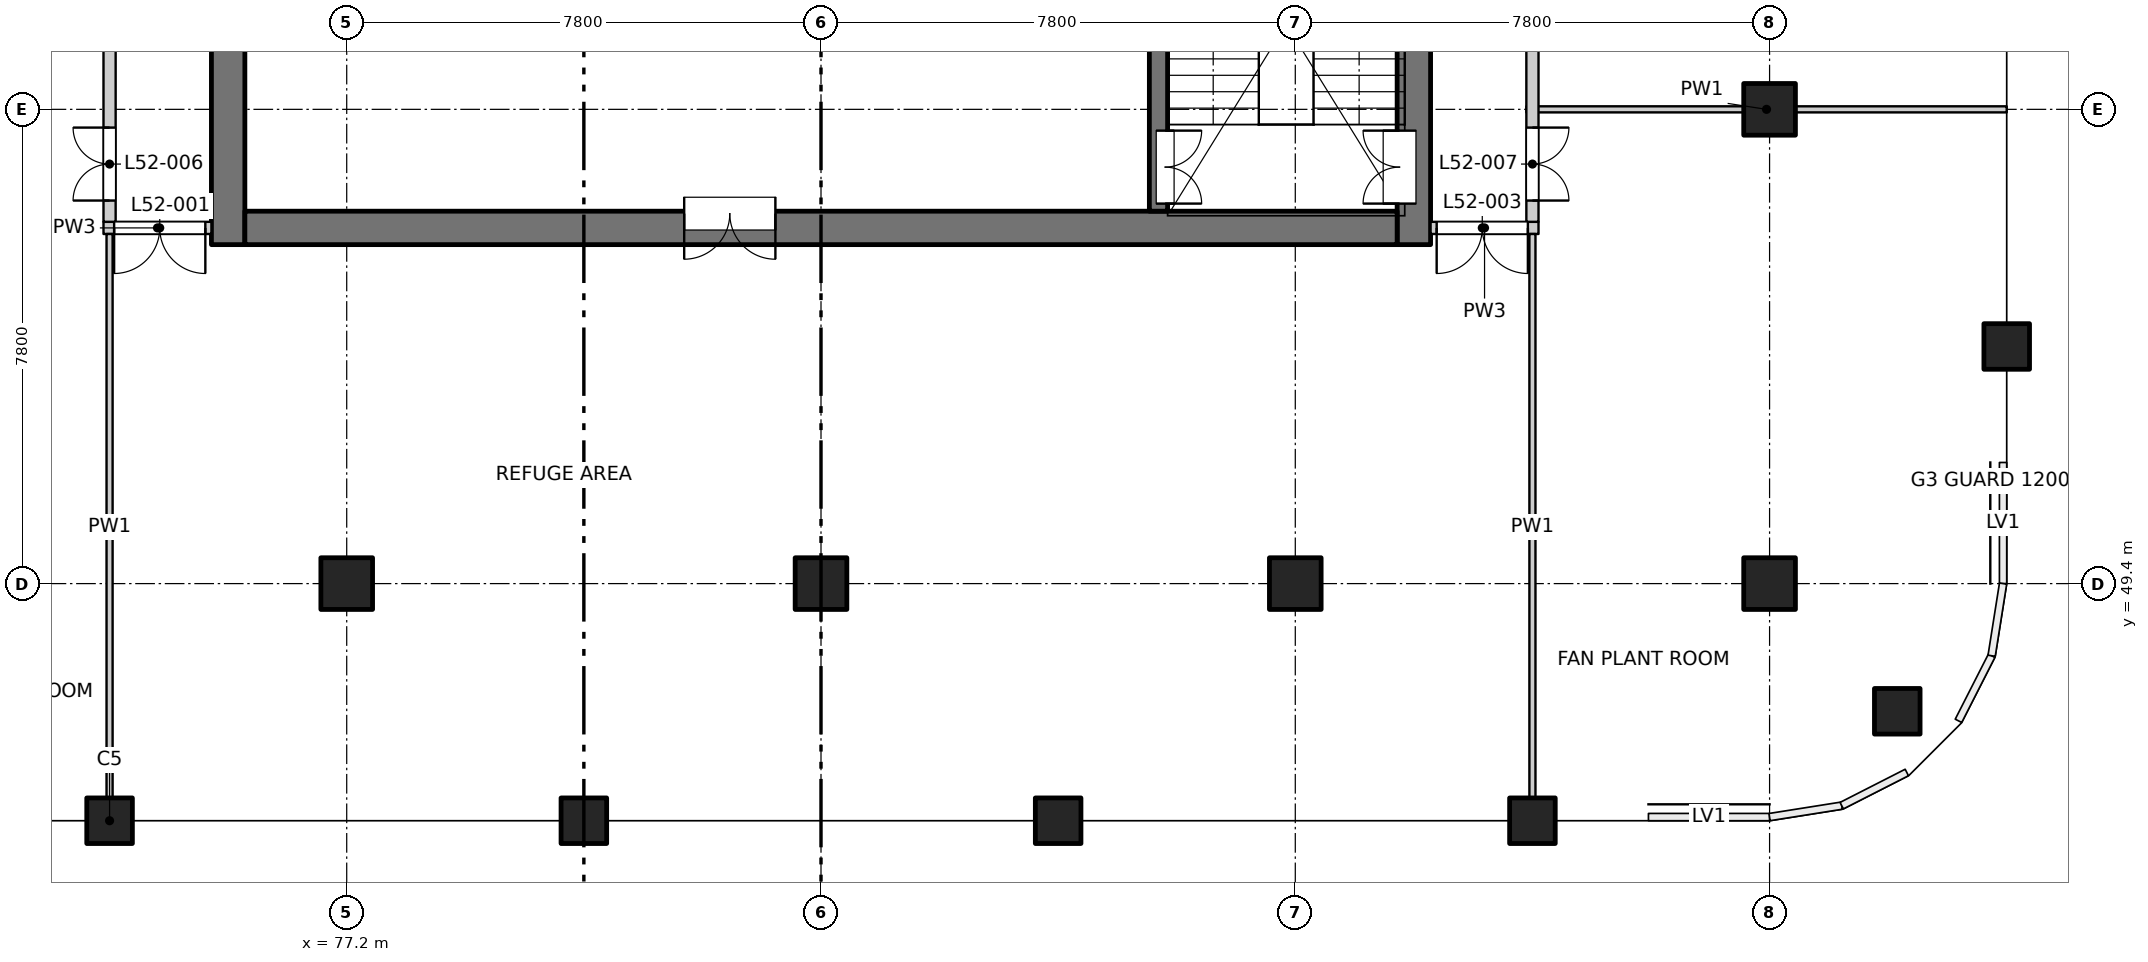
"""IFC4 building model, lengths in metres.
Left out: names, types, materials, properties, quantities, classifications, styles, units other than length and angle.
Written with IfcOpenShell. Run it as: python <this file> out.ifc"""

import sys

from ifc_helpers import new_model, si_unit, direction, frame, frame_2d, origin, origin_2d, place, context, subcontext, project, spatial, rectangle, extrude, element, fill, save


model = new_model("IFC4")
c1 = context("Model", 3, precision=1e-05, world=origin(), true_north=direction((0.0, 1.0)))
c2 = subcontext(c1, "Body", "Model", "MODEL_VIEW")
j1 = project(units=[si_unit("LENGTHUNIT", "METRE"), si_unit("PLANEANGLEUNIT", "RADIAN")], contexts=[c1])
p1 = place(None, origin())
s1 = spatial("IfcSite", under=j1, at=p1, CompositionType="ELEMENT")
p2 = place(p1, origin())
s2 = spatial("IfcBuilding", under=s1, at=p2, CompositionType="ELEMENT")
p3 = place(p2, frame((0.0, 0.0, 192.8)))
s3 = spatial("IfcBuildingStorey", under=s2, at=p3, CompositionType="ELEMENT", Elevation=192.8)
for number, where, z_axis, x_axis in (
    (1, (102.7, 47.3, -0.3), (0.0, 0.0, 1.0), (1.0, 0.0, 0.0)),
    (2, (104.5, 53.3, -0.3), (0.0, 0.0, 1.0), (1.0, 0.0, 0.0)),
    (3, (73.3, 45.5, -0.3), (0.0, 0.0, 1.0), (1.0, 0.0, 0.0)),
    (4, (81.1, 45.5, -0.3), (0.0, 0.0, 1.0), (1.0, 0.0, 0.0)),
    (5, (88.9, 45.5, -0.3), (0.0, 0.0, 1.0), (1.0, 0.0, 0.0)),
    (6, (96.7, 45.5, -0.3), (0.0, 0.0, 1.0), (1.0, 0.0, 0.0)),
):
    element("IfcColumn", number, at=place(p3, frame(where, z_axis=z_axis, x_axis=x_axis)), inside=s3, PredefinedType="COLUMN", context=c2, shape_type="SweptSolid", body=[
        extrude(rectangle(XDim=0.75, YDim=0.75, at=origin_2d()), origin(), (0.0, 0.0, 1.0), 4.5),
    ])
for number, where, z_axis, x_axis in (
    (7, (77.2, 49.4, -0.3), (0.0, 0.0, 1.0), (1.0, 0.0, 0.0)),
    (8, (85.0, 49.4, -0.3), (0.0, 0.0, 1.0), (1.0, 0.0, 0.0)),
    (9, (92.8, 49.4, -0.3), (0.0, 0.0, 1.0), (1.0, 0.0, 0.0)),
    (10, (100.6, 49.4, -0.3), (0.0, 0.0, 1.0), (1.0, 0.0, 0.0)),
    (11, (100.6, 57.2, -0.3), (0.0, 0.0, 1.0), (1.0, 0.0, 0.0)),
):
    element("IfcColumn", number, at=place(p3, frame(where, z_axis=z_axis, x_axis=x_axis)), inside=s3, PredefinedType="COLUMN", context=c2, shape_type="SweptSolid", body=[
        extrude(rectangle(XDim=0.85, YDim=0.85, at=origin_2d()), origin(), (0.0, 0.0, 1.0), 4.5),
    ])
p4 = place(p3, frame((75.25, 54.975, -0.3), z_axis=(0.0, 0.0, 1.0), x_axis=(0.0, 1.0, 0.0)))
e12 = element("IfcWall", 12, at=p4, inside=s3, PredefinedType="SOLIDWALL", context=c2, shape_type="SweptSolid", body=[
    extrude(rectangle(XDim=22.325, YDim=0.55, at=frame_2d((11.163, 0.0))), origin(), (0.0, 0.0, 1.0), 4.5),
])
p5 = place(p4, frame((7.475, 0.0, 0.3)))
e13 = element("IfcOpeningElement", 13, at=p5, cuts=e12, PredefinedType="OPENING", context=c2, shape_type="SweptSolid", body=[
    extrude(rectangle(XDim=0.9, YDim=2.1, at=frame_2d((0.45, 1.05))), frame((0.0, 0.285, 0.0), z_axis=(0.0, -1.0, 0.0), x_axis=(1.0, 0.0, 0.0)), (0.0, 0.0, 1.0), 0.57),
])
p6 = place(p4, frame((12.125, 0.0, 0.3)))
e14 = element("IfcOpeningElement", 14, at=p6, cuts=e12, PredefinedType="OPENING", context=c2, shape_type="SweptSolid", body=[
    extrude(rectangle(XDim=0.9, YDim=2.1, at=frame_2d((0.45, 1.05))), frame((0.0, 0.285, 0.0), z_axis=(0.0, -1.0, 0.0), x_axis=(1.0, 0.0, 0.0)), (0.0, 0.0, 1.0), 0.57),
])
p7 = place(p4, frame((16.625, 0.0, 0.3)))
e15 = element("IfcOpeningElement", 15, at=p7, cuts=e12, PredefinedType="OPENING", context=c2, shape_type="SweptSolid", body=[
    extrude(rectangle(XDim=0.9, YDim=2.1, at=frame_2d((0.45, 1.05))), frame((0.0, 0.285, 0.0), z_axis=(0.0, -1.0, 0.0), x_axis=(1.0, 0.0, 0.0)), (0.0, 0.0, 1.0), 0.57),
])
p8 = place(p4, frame((20.075, 0.0, 0.3)))
e16 = element("IfcOpeningElement", 16, at=p8, cuts=e12, PredefinedType="OPENING", context=c2, shape_type="SweptSolid", body=[
    extrude(rectangle(XDim=0.9, YDim=2.1, at=frame_2d((0.45, 1.05))), frame((0.0, 0.285, 0.0), z_axis=(0.0, -1.0, 0.0), x_axis=(1.0, 0.0, 0.0)), (0.0, 0.0, 1.0), 0.57),
])
p9 = place(p3, frame((94.75, 54.975, -0.3), z_axis=(0.0, 0.0, 1.0), x_axis=(0.0, 1.0, 0.0)))
e17 = element("IfcWall", 17, at=p9, inside=s3, PredefinedType="SOLIDWALL", context=c2, shape_type="SweptSolid", body=[
    extrude(rectangle(XDim=6.975, YDim=0.55, at=frame_2d((3.487, 0.0))), origin(), (0.0, 0.0, 1.0), 4.5),
])
p10 = place(p9, frame((0.675, 0.0, 0.3)))
e18 = element("IfcOpeningElement", 18, at=p10, cuts=e17, PredefinedType="OPENING", context=c2, shape_type="SweptSolid", body=[
    extrude(rectangle(XDim=1.2, YDim=2.1, at=frame_2d((0.6, 1.05))), frame((0.0, 0.285, 0.0), z_axis=(0.0, -1.0, 0.0), x_axis=(1.0, 0.0, 0.0)), (0.0, 0.0, 1.0), 0.57),
])
p11 = place(p3, frame((75.525, 55.25, -0.3), z_axis=(0.0, 0.0, 1.0), x_axis=(1.0, 0.0, 0.0)))
e19 = element("IfcWall", 19, at=p11, inside=s3, PredefinedType="SOLIDWALL", context=c2, shape_type="SweptSolid", body=[
    extrude(rectangle(XDim=18.95, YDim=0.55, at=frame_2d((9.475, 0.0))), origin(), (0.0, 0.0, 1.0), 4.5),
])
p12 = place(p11, frame((7.225, 0.0, 0.3)))
e20 = element("IfcOpeningElement", 20, at=p12, cuts=e19, PredefinedType="OPENING", context=c2, shape_type="SweptSolid", body=[
    extrude(rectangle(XDim=1.5, YDim=2.1, at=frame_2d((0.75, 1.05))), frame((0.0, 0.285, 0.0), z_axis=(0.0, -1.0, 0.0), x_axis=(1.0, 0.0, 0.0)), (0.0, 0.0, 1.0), 0.57),
])
p13 = place(p3, frame((90.55, 55.525, -0.3), z_axis=(0.0, 0.0, 1.0), x_axis=(0.0, 1.0, 0.0)))
e21 = element("IfcWall", 21, at=p13, inside=s3, PredefinedType="SOLIDWALL", context=c2, shape_type="SweptSolid", body=[
    extrude(rectangle(XDim=6.425, YDim=0.3, at=frame_2d((3.212, 0.0))), origin(), (0.0, 0.0, 1.0), 4.5),
])
p14 = place(p13, frame((0.125, 0.0, 0.3)))
e22 = element("IfcOpeningElement", 22, at=p14, cuts=e21, PredefinedType="OPENING", context=c2, shape_type="SweptSolid", body=[
    extrude(rectangle(XDim=1.2, YDim=2.1, at=frame_2d((0.6, 1.05))), frame((0.0, 0.16, 0.0), z_axis=(0.0, -1.0, 0.0), x_axis=(1.0, 0.0, 0.0)), (0.0, 0.0, 1.0), 0.32),
])
p15 = place(p3, frame((73.2, 55.25, 0.0), z_axis=(0.0, 0.0, 1.0), x_axis=(1.0, 0.0, 0.0)))
e23 = element("IfcWall", 23, at=p15, inside=s3, PredefinedType="PARTITIONING", context=c2, shape_type="SweptSolid", body=[
    extrude(rectangle(XDim=1.775, YDim=0.2, at=frame_2d((0.887, 0.0))), origin(), (0.0, 0.0, 1.0), 4.2),
])
p16 = place(p15, frame((0.175, 0.0, 0.0)))
e24 = element("IfcOpeningElement", 24, at=p16, cuts=e23, PredefinedType="OPENING", context=c2, shape_type="SweptSolid", body=[
    extrude(rectangle(XDim=1.5, YDim=2.1, at=frame_2d((0.75, 1.05))), frame((0.0, 0.11, 0.0), z_axis=(0.0, -1.0, 0.0), x_axis=(1.0, 0.0, 0.0)), (0.0, 0.0, 1.0), 0.22),
])
p17 = place(p3, frame((95.025, 55.25, 0.0), z_axis=(0.0, 0.0, 1.0), x_axis=(1.0, 0.0, 0.0)))
e25 = element("IfcWall", 25, at=p17, inside=s3, PredefinedType="PARTITIONING", context=c2, shape_type="SweptSolid", body=[
    extrude(rectangle(XDim=1.775, YDim=0.2, at=frame_2d((0.887, 0.0))), origin(), (0.0, 0.0, 1.0), 4.2),
])
p18 = place(p17, frame((0.1, 0.0, 0.0)))
e26 = element("IfcOpeningElement", 26, at=p18, cuts=e25, PredefinedType="OPENING", context=c2, shape_type="SweptSolid", body=[
    extrude(rectangle(XDim=1.5, YDim=2.1, at=frame_2d((0.75, 1.05))), frame((0.0, 0.11, 0.0), z_axis=(0.0, -1.0, 0.0), x_axis=(1.0, 0.0, 0.0)), (0.0, 0.0, 1.0), 0.22),
])
p19 = place(p3, frame((96.6, 57.2, 0.0), z_axis=(0.0, 0.0, 1.0), x_axis=(1.0, 0.0, 0.0)))
e27 = element("IfcWall", 27, at=p19, inside=s3, PredefinedType="PARTITIONING", context=c2, shape_type="SweptSolid", body=[
    extrude(rectangle(XDim=7.9, YDim=0.1, at=frame_2d((3.95, 0.0))), origin(), (0.0, 0.0, 1.0), 4.2),
])
p20 = place(p3, frame((73.3, 45.5, 0.0), z_axis=(0.0, 0.0, 1.0), x_axis=(0.0, 1.0, 0.0)))
e28 = element("IfcWall", 28, at=p20, inside=s3, PredefinedType="PARTITIONING", context=c2, shape_type="SweptSolid", body=[
    extrude(rectangle(XDim=9.65, YDim=0.1, at=frame_2d((4.825, 0.0))), origin(), (0.0, 0.0, 1.0), 4.2),
])
p21 = place(p3, frame((73.3, 55.35, 0.0), z_axis=(0.0, 0.0, 1.0), x_axis=(0.0, 1.0, 0.0)))
e29 = element("IfcWall", 29, at=p21, inside=s3, PredefinedType="PARTITIONING", context=c2, shape_type="SweptSolid", body=[
    extrude(rectangle(XDim=29.15, YDim=0.2, at=frame_2d((14.575, 0.0))), origin(), (0.0, 0.0, 1.0), 4.2),
])
p22 = place(p21, frame((0.35, 0.0, 0.0)))
e30 = element("IfcOpeningElement", 30, at=p22, cuts=e29, PredefinedType="OPENING", context=c2, shape_type="SweptSolid", body=[
    extrude(rectangle(XDim=1.2, YDim=2.1, at=frame_2d((0.6, 1.05))), frame((0.0, 0.11, 0.0), z_axis=(0.0, -1.0, 0.0), x_axis=(1.0, 0.0, 0.0)), (0.0, 0.0, 1.0), 0.22),
])
p23 = place(p21, frame((7.1, 0.0, 0.0)))
e31 = element("IfcOpeningElement", 31, at=p23, cuts=e29, PredefinedType="OPENING", context=c2, shape_type="SweptSolid", body=[
    extrude(rectangle(XDim=1.2, YDim=2.1, at=frame_2d((0.6, 1.05))), frame((0.0, 0.11, 0.0), z_axis=(0.0, -1.0, 0.0), x_axis=(1.0, 0.0, 0.0)), (0.0, 0.0, 1.0), 0.22),
])
p24 = place(p21, frame((26.6, 0.0, 0.0)))
e32 = element("IfcOpeningElement", 32, at=p24, cuts=e29, PredefinedType="OPENING", context=c2, shape_type="SweptSolid", body=[
    extrude(rectangle(XDim=1.2, YDim=2.1, at=frame_2d((0.6, 1.05))), frame((0.0, 0.11, 0.0), z_axis=(0.0, -1.0, 0.0), x_axis=(1.0, 0.0, 0.0)), (0.0, 0.0, 1.0), 0.22),
])
p25 = place(p3, frame((96.7, 45.5, 0.0), z_axis=(0.0, 0.0, 1.0), x_axis=(0.0, 1.0, 0.0)))
e33 = element("IfcWall", 33, at=p25, inside=s3, PredefinedType="PARTITIONING", context=c2, shape_type="SweptSolid", body=[
    extrude(rectangle(XDim=9.65, YDim=0.1, at=frame_2d((4.825, 0.0))), origin(), (0.0, 0.0, 1.0), 4.2),
])
p26 = place(p3, frame((96.7, 55.35, 0.0), z_axis=(0.0, 0.0, 1.0), x_axis=(0.0, 1.0, 0.0)))
e34 = element("IfcWall", 34, at=p26, inside=s3, PredefinedType="PARTITIONING", context=c2, shape_type="SweptSolid", body=[
    extrude(rectangle(XDim=29.15, YDim=0.2, at=frame_2d((14.575, 0.0))), origin(), (0.0, 0.0, 1.0), 4.2),
])
p27 = place(p26, frame((0.35, 0.0, 0.0)))
e35 = element("IfcOpeningElement", 35, at=p27, cuts=e34, PredefinedType="OPENING", context=c2, shape_type="SweptSolid", body=[
    extrude(rectangle(XDim=1.2, YDim=2.1, at=frame_2d((0.6, 1.05))), frame((0.0, 0.11, 0.0), z_axis=(0.0, -1.0, 0.0), x_axis=(1.0, 0.0, 0.0)), (0.0, 0.0, 1.0), 0.22),
])
p28 = place(p26, frame((3.2, 0.0, 0.0)))
e36 = element("IfcOpeningElement", 36, at=p28, cuts=e34, PredefinedType="OPENING", context=c2, shape_type="SweptSolid", body=[
    extrude(rectangle(XDim=1.2, YDim=2.1, at=frame_2d((0.6, 1.05))), frame((0.0, 0.11, 0.0), z_axis=(0.0, -1.0, 0.0), x_axis=(1.0, 0.0, 0.0)), (0.0, 0.0, 1.0), 0.22),
])
p29 = place(p26, frame((11.0, 0.0, 0.0)))
e37 = element("IfcOpeningElement", 37, at=p29, cuts=e34, PredefinedType="OPENING", context=c2, shape_type="SweptSolid", body=[
    extrude(rectangle(XDim=1.2, YDim=2.1, at=frame_2d((0.6, 1.05))), frame((0.0, 0.11, 0.0), z_axis=(0.0, -1.0, 0.0), x_axis=(1.0, 0.0, 0.0)), (0.0, 0.0, 1.0), 0.22),
])
p30 = place(p26, frame((26.6, 0.0, 0.0)))
e38 = element("IfcOpeningElement", 38, at=p30, cuts=e34, PredefinedType="OPENING", context=c2, shape_type="SweptSolid", body=[
    extrude(rectangle(XDim=1.2, YDim=2.1, at=frame_2d((0.6, 1.05))), frame((0.0, 0.11, 0.0), z_axis=(0.0, -1.0, 0.0), x_axis=(1.0, 0.0, 0.0)), (0.0, 0.0, 1.0), 0.22),
])
p31 = place(p16, origin())
e39 = element("IfcDoor", 39, at=p31, inside=s3, OperationType="DOUBLE_DOOR_SINGLE_SWING", PredefinedType="DOOR", context=c2, shape_type="SweptSolid", body=[
    extrude(rectangle(XDim=1.5, YDim=2.1, at=frame_2d((0.75, 1.05))), frame((0.0, 0.025, 0.0), z_axis=(0.0, -1.0, 0.0), x_axis=(1.0, 0.0, 0.0)), (0.0, 0.0, 1.0), 0.05),
])
fill(e24, e39)
p32 = place(p12, origin())
e40 = element("IfcDoor", 40, at=p32, inside=s3, OperationType="DOUBLE_DOOR_SINGLE_SWING", PredefinedType="DOOR", context=c2, shape_type="SweptSolid", body=[
    extrude(rectangle(XDim=1.5, YDim=2.1, at=frame_2d((0.75, 1.05))), frame((0.0, 0.26, 0.0), z_axis=(0.0, -1.0, 0.0), x_axis=(1.0, 0.0, 0.0)), (0.0, 0.0, 1.0), 0.05),
])
fill(e20, e40)
p33 = place(p18, origin())
e41 = element("IfcDoor", 41, at=p33, inside=s3, OperationType="DOUBLE_DOOR_SINGLE_SWING", PredefinedType="DOOR", context=c2, shape_type="SweptSolid", body=[
    extrude(rectangle(XDim=1.5, YDim=2.1, at=frame_2d((0.75, 1.05))), frame((0.0, 0.025, 0.0), z_axis=(0.0, -1.0, 0.0), x_axis=(1.0, 0.0, 0.0)), (0.0, 0.0, 1.0), 0.05),
])
fill(e26, e41)
p34 = place(p14, origin())
e42 = element("IfcDoor", 42, at=p34, inside=s3, OperationType="DOUBLE_DOOR_SINGLE_SWING", PredefinedType="DOOR", context=c2, shape_type="SweptSolid", body=[
    extrude(rectangle(XDim=1.2, YDim=2.1, at=frame_2d((0.6, 1.05))), frame((0.0, -0.085, 0.0), z_axis=(0.0, -1.0, 0.0), x_axis=(1.0, 0.0, 0.0)), (0.0, 0.0, 1.0), 0.05),
])
fill(e22, e42)
p35 = place(p10, origin())
e43 = element("IfcDoor", 43, at=p35, inside=s3, OperationType="DOUBLE_DOOR_SINGLE_SWING", PredefinedType="DOOR", context=c2, shape_type="SweptSolid", body=[
    extrude(rectangle(XDim=1.2, YDim=2.1, at=frame_2d((0.6, 1.05))), frame((0.0, 0.26, 0.0), z_axis=(0.0, -1.0, 0.0), x_axis=(1.0, 0.0, 0.0)), (0.0, 0.0, 1.0), 0.05),
])
fill(e18, e43)
p36 = place(p22, origin())
e44 = element("IfcDoor", 44, at=p36, inside=s3, OperationType="DOUBLE_DOOR_SINGLE_SWING", PredefinedType="DOOR", context=c2, shape_type="SweptSolid", body=[
    extrude(rectangle(XDim=1.2, YDim=2.1, at=frame_2d((0.6, 1.05))), frame((0.0, 0.025, 0.0), z_axis=(0.0, -1.0, 0.0), x_axis=(1.0, 0.0, 0.0)), (0.0, 0.0, 1.0), 0.05),
])
fill(e30, e44)
p37 = place(p27, origin())
e45 = element("IfcDoor", 45, at=p37, inside=s3, OperationType="DOUBLE_DOOR_SINGLE_SWING", PredefinedType="DOOR", context=c2, shape_type="SweptSolid", body=[
    extrude(rectangle(XDim=1.2, YDim=2.1, at=frame_2d((0.6, 1.05))), frame((0.0, 0.025, 0.0), z_axis=(0.0, -1.0, 0.0), x_axis=(1.0, 0.0, 0.0)), (0.0, 0.0, 1.0), 0.05),
])
fill(e35, e45)
save(model, sys.argv[1])
